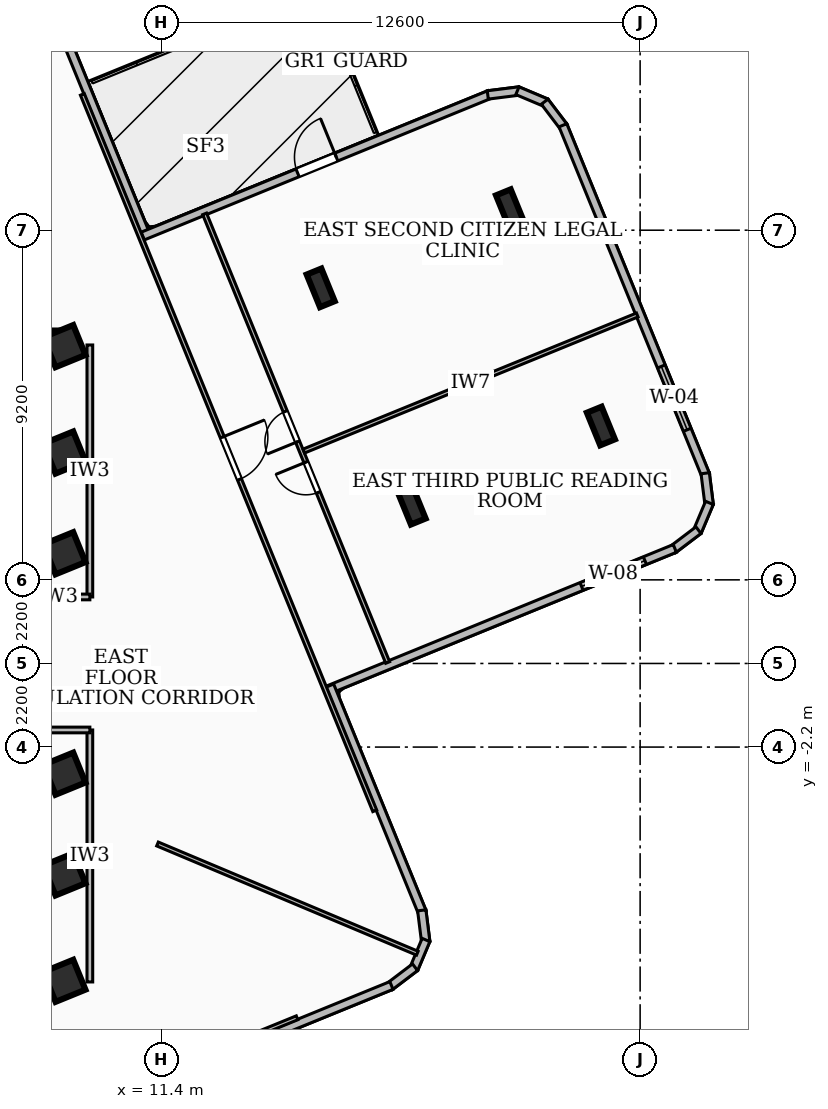
"""IFC4 building model, lengths in metres.
Left out: names, types, materials, properties, quantities, classifications, styles, units other than length and angle.
Written with IfcOpenShell. Run it as: python <this file> out.ifc"""

import sys

from ifc_helpers import new_model, si_unit, direction, frame, frame_2d, origin, origin_2d, place, context, subcontext, project, spatial, rectangle, i_section, extrude, element, fill, save


model = new_model("IFC4")
c1 = context("Model", 3, precision=1e-05, world=origin(), true_north=direction((0.0, 1.0)))
c2 = subcontext(c1, "Body", "Model", "MODEL_VIEW")
j1 = project(units=[si_unit("LENGTHUNIT", "METRE"), si_unit("PLANEANGLEUNIT", "RADIAN")], contexts=[c1])
p1 = place(None, origin())
s1 = spatial("IfcSite", under=j1, at=p1, CompositionType="ELEMENT")
p2 = place(p1, origin())
s2 = spatial("IfcBuilding", under=s1, at=p2, CompositionType="ELEMENT")
p3 = place(p2, frame((0.0, 0.0, 173.88)))
s3 = spatial("IfcBuildingStorey", under=s2, at=p3, CompositionType="ELEMENT", Elevation=173.88)
for number, where, z_axis, x_axis in (
    (1, (-8.78, 8.535, 0.0), (0.0, 0.0, 1.0), (1.0, 0.0, 0.0)),
    (2, (8.78, -8.535, 0.0), (0.0, 0.0, 1.0), (-1.0, 0.0, 0.0)),
):
    element("IfcWall", number, at=place(p3, frame(where, z_axis=z_axis, x_axis=x_axis)), inside=s3, PredefinedType="SHEAR", context=c2, shape_type="SweptSolid", body=[
        extrude(rectangle(XDim=17.56, YDim=0.45, at=frame_2d((8.78, 0.0))), origin(), (0.0, 0.0, 1.0), 3.34),
    ])
for number, where, z_axis, x_axis in (
    (3, (8.85, -5.55, 0.0), (0.0, 0.0, 1.0), (0.926, 0.378, 0.0)),
    (4, (8.85, -2.9, 0.0), (0.0, 0.0, 1.0), (0.926, 0.378, 0.0)),
    (5, (8.85, 2.9, 0.0), (0.0, 0.0, 1.0), (0.926, 0.378, 0.0)),
    (6, (8.85, 5.55, 0.0), (0.0, 0.0, 1.0), (0.926, 0.378, 0.0)),
    (7, (8.85, -8.35, 0.0), (0.0, 0.0, 1.0), (0.926, 0.378, 0.0)),
    (8, (8.85, 8.35, 0.0), (0.0, 0.0, 1.0), (0.926, 0.378, 0.0)),
):
    element("IfcColumn", number, at=place(p3, frame(where, z_axis=z_axis, x_axis=x_axis)), inside=s3, PredefinedType="COLUMN", context=c2, shape_type="SweptSolid", body=[
        extrude(rectangle(XDim=0.85, YDim=0.85, at=origin_2d()), origin(), (0.0, 0.0, 1.0), 3.6),
    ])
for number, where, z_axis, x_axis in (
    (9, (17.987, 4.164, 0.0), (0.0, 0.0, 1.0), (0.926, 0.378, 0.0)),
    (10, (15.594, 9.883, 0.0), (0.0, 0.0, 1.0), (0.926, 0.378, 0.0)),
    (11, (22.968, 6.248, 0.0), (0.0, 0.0, 1.0), (0.926, 0.378, 0.0)),
    (12, (20.576, 11.967, 0.0), (0.0, 0.0, 1.0), (0.926, 0.378, 0.0)),
):
    element("IfcColumn", number, at=place(p3, frame(where, z_axis=z_axis, x_axis=x_axis)), inside=s3, PredefinedType="COLUMN", context=c2, shape_type="SweptSolid", body=[
        extrude(i_section(OverallWidth=0.418, OverallDepth=0.927, WebThickness=0.019, FlangeThickness=0.032, at=origin_2d()), origin(), (0.0, 0.0, 1.0), 3.6),
    ])
p4 = place(p3, frame((8.473, 17.456, 0.0), z_axis=(0.0, 0.0, 1.0), x_axis=(0.377728271133, -0.925916493636, 0.0)))
e13 = element("IfcWall", 13, at=p4, inside=s3, PredefinedType="SOLIDWALL", context=c2, shape_type="SweptSolid", body=[
    extrude(rectangle(XDim=6.759, YDim=0.22, at=frame_2d((3.379, 0.0))), origin(), (0.0, 0.0, 1.0), 2.644),
])
p5 = place(p3, frame((10.912, 11.246, 0.0), z_axis=(0.0, 0.0, 1.0), x_axis=(0.925863027914, 0.377859303897, 0.0)))
e14 = element("IfcWall", 14, at=p5, inside=s3, PredefinedType="SOLIDWALL", context=c2, shape_type="SweptSolid", body=[
    extrude(rectangle(XDim=9.858, YDim=0.22, at=frame_2d((4.929, 0.0))), origin(), (0.0, 0.0, 1.0), 2.644),
])
p6 = place(p5, frame((4.4, 0.0, 0.0)))
e15 = element("IfcOpeningElement", 15, at=p6, cuts=e14, PredefinedType="OPENING", context=c2, shape_type="SweptSolid", body=[
    extrude(rectangle(XDim=1.1, YDim=2.1, at=frame_2d((0.55, 1.05))), frame((0.0, 0.12, 0.0), z_axis=(0.0, -1.0, 0.0), x_axis=(1.0, 0.0, 0.0)), (0.0, 0.0, 1.0), 0.24),
])
p7 = place(p3, frame((19.991, 14.959, 0.0), z_axis=(0.0, 0.0, 1.0), x_axis=(0.992205706202, 0.124610740225, 0.0)))
e16 = element("IfcWall", 16, at=p7, inside=s3, PredefinedType="SOLIDWALL", context=c2, shape_type="SweptSolid", body=[
    extrude(rectangle(XDim=0.835, YDim=0.22, at=frame_2d((0.417, 0.0))), origin(), (0.0, 0.0, 1.0), 3.34),
])
p8 = place(p3, frame((20.771, 15.07, 0.0), z_axis=(0.0, 0.0, 1.0), x_axis=(0.92151752204, -0.388336782412, 0.0)))
e17 = element("IfcWall", 17, at=p8, inside=s3, PredefinedType="SOLIDWALL", context=c2, shape_type="SweptSolid", body=[
    extrude(rectangle(XDim=0.819, YDim=0.22, at=frame_2d((0.41, 0.0))), origin(), (0.0, 0.0, 1.0), 3.34),
])
p9 = place(p3, frame((21.488, 14.782, 0.0), z_axis=(0.0, 0.0, 1.0), x_axis=(0.604489037034, -0.796613459657, 0.0)))
e18 = element("IfcWall", 18, at=p9, inside=s3, PredefinedType="SOLIDWALL", context=c2, shape_type="SweptSolid", body=[
    extrude(rectangle(XDim=0.833, YDim=0.22, at=frame_2d((0.417, 0.0))), origin(), (0.0, 0.0, 1.0), 3.34),
])
p10 = place(p3, frame((21.968, 14.161, 0.0), z_axis=(0.0, 0.0, 1.0), x_axis=(0.377847588582, -0.925867809032, 0.0)))
e19 = element("IfcWall", 19, at=p10, inside=s3, PredefinedType="SOLIDWALL", context=c2, shape_type="SweptSolid", body=[
    extrude(rectangle(XDim=9.941, YDim=0.22, at=frame_2d((4.97, 0.0))), origin(), (0.0, 0.0, 1.0), 3.34),
])
p11 = place(p10, frame((6.854, 0.0, 0.85)))
e20 = element("IfcOpeningElement", 20, at=p11, cuts=e19, PredefinedType="OPENING", context=c2, shape_type="SweptSolid", body=[
    extrude(rectangle(XDim=1.8, YDim=2.0, at=frame_2d((0.9, 1.0))), frame((0.0, 0.12, 0.0), z_axis=(0.0, -1.0, 0.0), x_axis=(1.0, 0.0, 0.0)), (0.0, 0.0, 1.0), 0.24),
])
p12 = place(p3, frame((25.712, 5.005, 0.0), z_axis=(0.0, 0.0, 1.0), x_axis=(0.124646916858, -0.992201162123, 0.0)))
e21 = element("IfcWall", 21, at=p12, inside=s3, PredefinedType="SOLIDWALL", context=c2, shape_type="SweptSolid", body=[
    extrude(rectangle(XDim=0.834, YDim=0.22, at=frame_2d((0.417, 0.0))), origin(), (0.0, 0.0, 1.0), 3.34),
])
p13 = place(p3, frame((25.823, 4.225, 0.0), z_axis=(0.0, 0.0, 1.0), x_axis=(-0.387804180062, -0.921741784844, 0.0)))
e22 = element("IfcWall", 22, at=p13, inside=s3, PredefinedType="SOLIDWALL", context=c2, shape_type="SweptSolid", body=[
    extrude(rectangle(XDim=0.82, YDim=0.22, at=frame_2d((0.41, 0.0))), origin(), (0.0, 0.0, 1.0), 3.34),
])
p14 = place(p3, frame((25.535, 3.507, 0.0), z_axis=(0.0, 0.0, 1.0), x_axis=(-0.796793288666, -0.604251979837, 0.0)))
e23 = element("IfcWall", 23, at=p14, inside=s3, PredefinedType="SOLIDWALL", context=c2, shape_type="SweptSolid", body=[
    extrude(rectangle(XDim=0.834, YDim=0.22, at=frame_2d((0.417, 0.0))), origin(), (0.0, 0.0, 1.0), 3.34),
])
p15 = place(p3, frame((24.913, 3.027, 0.0), z_axis=(0.0, 0.0, 1.0), x_axis=(-0.925892554472, -0.37778694733, 0.0)))
e24 = element("IfcWall", 24, at=p15, inside=s3, PredefinedType="SOLIDWALL", context=c2, shape_type="SweptSolid", body=[
    extrude(rectangle(XDim=9.858, YDim=0.22, at=frame_2d((4.929, 0.0))), origin(), (0.0, 0.0, 1.0), 3.34),
])
p16 = place(p15, frame((0.85, 0.0, 0.85)))
e25 = element("IfcOpeningElement", 25, at=p16, cuts=e24, PredefinedType="OPENING", context=c2, shape_type="SweptSolid", body=[
    extrude(rectangle(XDim=1.8, YDim=1.8, at=frame_2d((0.9, 0.9))), frame((0.0, 0.12, 0.0), z_axis=(0.0, -1.0, 0.0), x_axis=(1.0, 0.0, 0.0)), (0.0, 0.0, 1.0), 0.24),
])
p17 = place(p3, frame((15.834, -0.583, 0.0), z_axis=(0.0, 0.0, 1.0), x_axis=(0.377776256629, -0.925896916469, 0.0)))
e26 = element("IfcWall", 26, at=p17, inside=s3, PredefinedType="SOLIDWALL", context=c2, shape_type="SweptSolid", body=[
    extrude(rectangle(XDim=6.438, YDim=0.22, at=frame_2d((3.219, 0.0))), origin(), (0.0, 0.0, 1.0), 3.34),
])
p18 = place(p3, frame((18.254, -6.496, 0.0), z_axis=(0.0, 0.0, 1.0), x_axis=(0.124646916858, -0.992201162123, 0.0)))
e27 = element("IfcWall", 27, at=p18, inside=s3, PredefinedType="SOLIDWALL", context=c2, shape_type="SweptSolid", body=[
    extrude(rectangle(XDim=0.834, YDim=0.22, at=frame_2d((0.417, 0.0))), origin(), (0.0, 0.0, 1.0), 3.34),
])
p19 = place(p3, frame((18.365, -7.276, 0.0), z_axis=(0.0, 0.0, 1.0), x_axis=(-0.387977068381, -0.9216690265, 0.0)))
e28 = element("IfcWall", 28, at=p19, inside=s3, PredefinedType="SOLIDWALL", context=c2, shape_type="SweptSolid", body=[
    extrude(rectangle(XDim=0.819, YDim=0.22, at=frame_2d((0.41, 0.0))), origin(), (0.0, 0.0, 1.0), 3.34),
])
p20 = place(p3, frame((18.077, -7.993, 0.0), z_axis=(0.0, 0.0, 1.0), x_axis=(-0.796365329878, -0.604815890473, 0.0)))
e29 = element("IfcWall", 29, at=p20, inside=s3, PredefinedType="SOLIDWALL", context=c2, shape_type="SweptSolid", body=[
    extrude(rectangle(XDim=0.833, YDim=0.22, at=frame_2d((0.417, 0.0))), origin(), (0.0, 0.0, 1.0), 3.34),
])
p21 = place(p3, frame((17.456, -8.473, 0.0), z_axis=(0.0, 0.0, 1.0), x_axis=(-0.925916493636, -0.377728271133, 0.0)))
e30 = element("IfcWall", 30, at=p21, inside=s3, PredefinedType="SOLIDWALL", context=c2, shape_type="SweptSolid", body=[
    extrude(rectangle(XDim=6.759, YDim=0.22, at=frame_2d((3.379, 0.0))), origin(), (0.0, 0.0, 1.0), 3.34),
])
p22 = place(p3, frame((9.52, 1.75, 0.0), z_axis=(0.0, 0.0, 1.0), x_axis=(0.0, 1.0, 0.0)))
e31 = element("IfcWall", 31, at=p22, inside=s3, PredefinedType="PARTITIONING", context=c2, shape_type="SweptSolid", body=[
    extrude(rectangle(XDim=6.63, YDim=0.15, at=frame_2d((3.315, 0.0))), origin(), (0.0, 0.0, 1.0), 2.644),
])
p23 = place(p3, frame((7.85, 1.75, 0.0), z_axis=(0.0, 0.0, 1.0), x_axis=(1.0, 0.0, 0.0)))
e32 = element("IfcWall", 32, at=p23, inside=s3, PredefinedType="PARTITIONING", context=c2, shape_type="SweptSolid", body=[
    extrude(rectangle(XDim=1.67, YDim=0.15, at=frame_2d((0.835, 0.0))), origin(), (0.0, 0.0, 1.0), 2.57),
])
p24 = place(p3, frame((9.52, -8.38, 0.0), z_axis=(0.0, 0.0, 1.0), x_axis=(0.0, 1.0, 0.0)))
e33 = element("IfcWall", 33, at=p24, inside=s3, PredefinedType="PARTITIONING", context=c2, shape_type="SweptSolid", body=[
    extrude(rectangle(XDim=6.63, YDim=0.15, at=frame_2d((3.315, 0.0))), origin(), (0.0, 0.0, 1.0), 3.34),
])
p25 = place(p3, frame((7.85, -1.75, 0.0), z_axis=(0.0, 0.0, 1.0), x_axis=(1.0, 0.0, 0.0)))
e34 = element("IfcWall", 34, at=p25, inside=s3, PredefinedType="PARTITIONING", context=c2, shape_type="SweptSolid", body=[
    extrude(rectangle(XDim=1.67, YDim=0.15, at=frame_2d((0.835, 0.0))), origin(), (0.0, 0.0, 1.0), 2.57),
])
p26 = place(p3, frame((11.3, -4.75, 0.0), z_axis=(0.0, 0.0, 1.0), x_axis=(0.92186077199, -0.387521247245, 0.0)))
e35 = element("IfcWall", 35, at=p26, inside=s3, PredefinedType="PARTITIONING", context=c2, shape_type="SweptSolid", body=[
    extrude(rectangle(XDim=7.417, YDim=0.11, at=frame_2d((3.708, 0.0))), origin(), (0.0, 0.0, 1.0), 3.34),
])
p27 = place(p3, frame((9.323, 14.973, 0.0), z_axis=(0.0, 0.0, 1.0), x_axis=(0.377891753295, -0.92584978414, 0.0)))
e36 = element("IfcWall", 36, at=p27, inside=s3, PredefinedType="PARTITIONING", context=c2, shape_type="SweptSolid", body=[
    extrude(rectangle(XDim=20.361, YDim=0.11, at=frame_2d((10.18, 0.0))), origin(), (0.0, 0.0, 1.0), 2.644),
])
p28 = place(p27, frame((9.741, 0.0, 0.0)))
e37 = element("IfcOpeningElement", 37, at=p28, cuts=e36, PredefinedType="OPENING", context=c2, shape_type="SweptSolid", body=[
    extrude(rectangle(XDim=1.2, YDim=2.1, at=frame_2d((0.6, 1.05))), frame((0.0, 0.065, 0.0), z_axis=(0.0, -1.0, 0.0), x_axis=(1.0, 0.0, 0.0)), (0.0, 0.0, 1.0), 0.13),
])
p29 = place(p3, frame((15.151, 5.589, 0.0), z_axis=(0.0, 0.0, 1.0), x_axis=(0.925886825242, 0.37780098841, 0.0)))
e38 = element("IfcWall", 38, at=p29, inside=s3, PredefinedType="PARTITIONING", context=c2, shape_type="SweptSolid", body=[
    extrude(rectangle(XDim=9.475, YDim=0.11, at=frame_2d((4.738, 0.0))), origin(), (0.0, 0.0, 1.0), 3.34),
])
p30 = place(p3, frame((17.357, 0.025, 0.0), z_axis=(0.0, 0.0, 1.0), x_axis=(-0.37779315338, 0.925890022227, 0.0)))
e39 = element("IfcWall", 39, at=p30, inside=s3, PredefinedType="PARTITIONING", context=c2, shape_type="SweptSolid", body=[
    extrude(rectangle(XDim=12.75, YDim=0.11, at=frame_2d((6.375, 0.0))), origin(), (0.0, 0.0, 1.0), 2.644),
])
p31 = place(p30, frame((4.835, 0.0, 0.0)))
e40 = element("IfcOpeningElement", 40, at=p31, cuts=e39, PredefinedType="OPENING", context=c2, shape_type="SweptSolid", body=[
    extrude(rectangle(XDim=0.86, YDim=2.04, at=frame_2d((0.43, 1.02))), frame((0.0, 0.065, 0.0), z_axis=(0.0, -1.0, 0.0), x_axis=(1.0, 0.0, 0.0)), (0.0, 0.0, 1.0), 0.13),
])
p32 = place(p30, frame((6.275, 0.0, 0.0)))
e41 = element("IfcOpeningElement", 41, at=p32, cuts=e39, PredefinedType="OPENING", context=c2, shape_type="SweptSolid", body=[
    extrude(rectangle(XDim=0.86, YDim=2.04, at=frame_2d((0.43, 1.02))), frame((0.0, 0.065, 0.0), z_axis=(0.0, -1.0, 0.0), x_axis=(1.0, 0.0, 0.0)), (0.0, 0.0, 1.0), 0.13),
])
p33 = place(p3, frame((14.973, -9.323, 0.0), z_axis=(0.0, 0.0, 1.0), x_axis=(-0.92584978414, -0.377891753295, 0.0)))
e42 = element("IfcWall", 42, at=p33, inside=s3, PredefinedType="PARTITIONING", context=c2, shape_type="SweptSolid", body=[
    extrude(rectangle(XDim=20.361, YDim=0.11, at=frame_2d((10.18, 0.0))), origin(), (0.0, 0.0, 1.0), 2.644),
])
p34 = place(p33, frame((9.741, 0.0, 0.0)))
e43 = element("IfcOpeningElement", 43, at=p34, cuts=e42, PredefinedType="OPENING", context=c2, shape_type="SweptSolid", body=[
    extrude(rectangle(XDim=1.2, YDim=2.1, at=frame_2d((0.6, 1.05))), frame((0.0, 0.065, 0.0), z_axis=(0.0, -1.0, 0.0), x_axis=(1.0, 0.0, 0.0)), (0.0, 0.0, 1.0), 0.13),
])
p35 = place(p6, origin())
e44 = element("IfcDoor", 44, at=p35, inside=s3, OperationType="SINGLE_SWING_RIGHT", PredefinedType="DOOR", context=c2, shape_type="SweptSolid", body=[
    extrude(rectangle(XDim=1.1, YDim=2.1, at=frame_2d((0.55, 1.05))), frame((0.0, 0.025, 0.0), z_axis=(0.0, -1.0, 0.0), x_axis=(1.0, 0.0, 0.0)), (0.0, 0.0, 1.0), 0.05),
])
fill(e15, e44)
p36 = place(p11, origin())
e45 = element("IfcWindow", 45, at=p36, inside=s3, PartitioningType="SINGLE_PANEL", PredefinedType="WINDOW", context=c2, shape_type="SweptSolid", body=[
    extrude(rectangle(XDim=1.8, YDim=2.0, at=frame_2d((0.9, 1.0))), frame((0.0, 0.03, 0.0), z_axis=(0.0, -1.0, 0.0), x_axis=(1.0, 0.0, 0.0)), (0.0, 0.0, 1.0), 0.06),
])
fill(e20, e45)
p37 = place(p16, origin())
e46 = element("IfcWindow", 46, at=p37, inside=s3, PartitioningType="SINGLE_PANEL", PredefinedType="WINDOW", context=c2, shape_type="SweptSolid", body=[
    extrude(rectangle(XDim=1.8, YDim=1.8, at=frame_2d((0.9, 0.9))), frame((0.0, 0.03, 0.0), z_axis=(0.0, -1.0, 0.0), x_axis=(1.0, 0.0, 0.0)), (0.0, 0.0, 1.0), 0.06),
])
fill(e25, e46)
p38 = place(p28, origin())
e47 = element("IfcDoor", 47, at=p38, inside=s3, OperationType="SINGLE_SWING_LEFT", PredefinedType="DOOR", context=c2, shape_type="SweptSolid", body=[
    extrude(rectangle(XDim=1.2, YDim=2.1, at=frame_2d((0.6, 1.05))), frame((0.0, 0.025, 0.0), z_axis=(0.0, -1.0, 0.0), x_axis=(1.0, 0.0, 0.0)), (0.0, 0.0, 1.0), 0.05),
])
fill(e37, e47)
p39 = place(p31, origin())
e48 = element("IfcDoor", 48, at=p39, inside=s3, OperationType="SINGLE_SWING_RIGHT", PredefinedType="DOOR", context=c2, shape_type="SweptSolid", body=[
    extrude(rectangle(XDim=0.86, YDim=2.04, at=frame_2d((0.43, 1.02))), frame((0.0, 0.025, 0.0), z_axis=(0.0, -1.0, 0.0), x_axis=(1.0, 0.0, 0.0)), (0.0, 0.0, 1.0), 0.05),
])
fill(e40, e48)
p40 = place(p32, origin())
e49 = element("IfcDoor", 49, at=p40, inside=s3, OperationType="SINGLE_SWING_LEFT", PredefinedType="DOOR", context=c2, shape_type="SweptSolid", body=[
    extrude(rectangle(XDim=0.86, YDim=2.04, at=frame_2d((0.43, 1.02))), frame((0.0, 0.025, 0.0), z_axis=(0.0, -1.0, 0.0), x_axis=(1.0, 0.0, 0.0)), (0.0, 0.0, 1.0), 0.05),
])
fill(e41, e49)
save(model, sys.argv[1])
